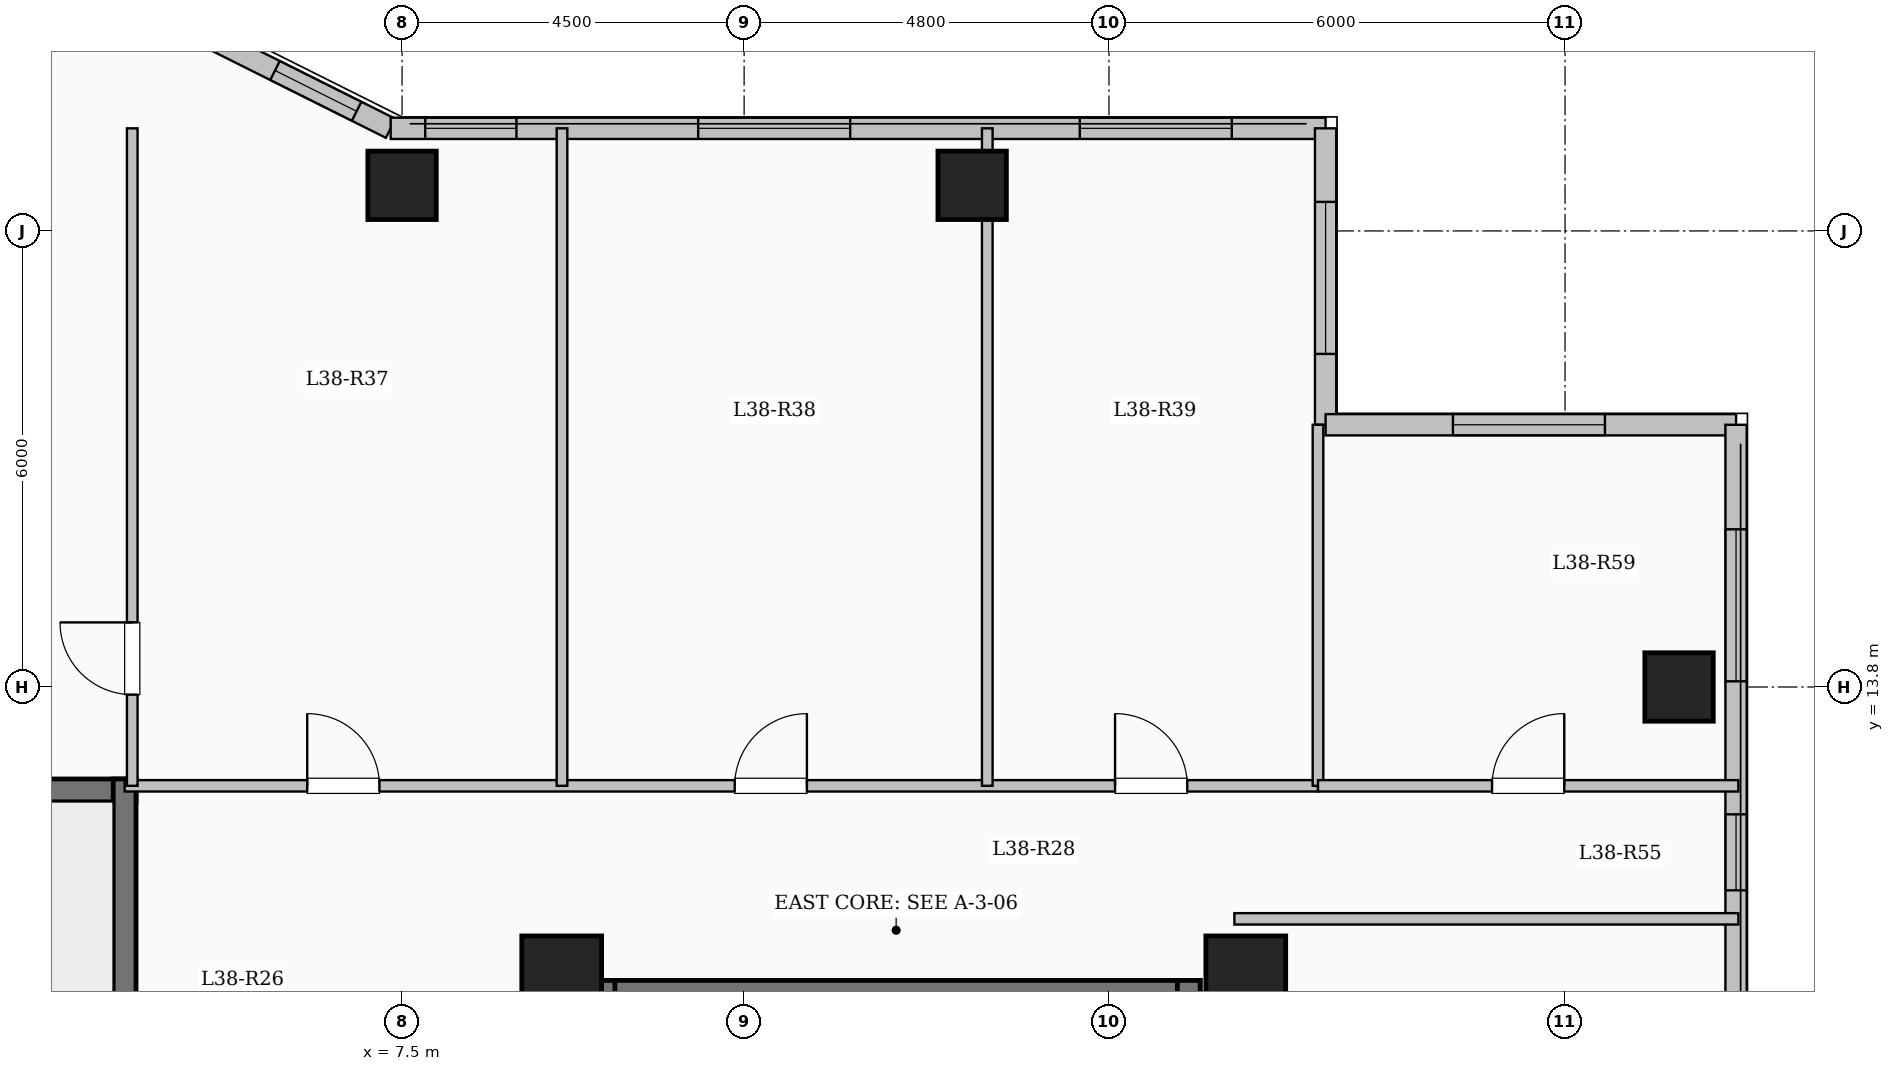
"""IFC4 building model, lengths in metres.
Left out: names, types, materials, properties, quantities, classifications, styles, units other than length and angle.
Written with IfcOpenShell. Run it as: python <this file> out.ifc"""

import sys

from ifc_helpers import new_model, si_unit, direction, frame, frame_2d, origin, origin_2d, place, context, subcontext, project, spatial, rectangle, extrude, element, fill, save


model = new_model("IFC4")
c1 = context("Model", 3, precision=1e-05, world=origin(), true_north=direction((0.0, 1.0)))
c2 = subcontext(c1, "Body", "Model", "MODEL_VIEW")
j1 = project(units=[si_unit("LENGTHUNIT", "METRE"), si_unit("PLANEANGLEUNIT", "RADIAN")], contexts=[c1])
p1 = place(None, origin())
s1 = spatial("IfcSite", under=j1, at=p1, CompositionType="ELEMENT")
p2 = place(p1, origin())
s2 = spatial("IfcBuilding", under=s1, at=p2, CompositionType="ELEMENT")
p3 = place(p2, frame((0.0, 0.0, 142.65)))
s3 = spatial("IfcBuildingStorey", under=s2, at=p3, CompositionType="ELEMENT", Elevation=142.65)
for number, where, z_axis, x_axis in (
    (1, (9.6, 10.0, 0.0), (0.0, 0.0, 1.0), (1.0, 0.0, 0.0)),
    (2, (18.6, 10.0, 0.0), (0.0, 0.0, 1.0), (1.0, 0.0, 0.0)),
):
    element("IfcColumn", number, at=place(p3, frame(where, z_axis=z_axis, x_axis=x_axis)), inside=s3, PredefinedType="COLUMN", context=c2, shape_type="SweptSolid", body=[
        extrude(rectangle(XDim=1.05, YDim=1.05, at=origin_2d()), origin(), (0.0, 0.0, 1.0), 3.35),
    ])
for number, where, z_axis, x_axis in (
    (3, (7.5, 20.4, 0.0), (0.0, 0.0, 1.0), (1.0, 0.0, 0.0)),
    (4, (15.0, 20.4, 0.0), (0.0, 0.0, 1.0), (1.0, 0.0, 0.0)),
    (5, (24.3, 13.8, 0.0), (0.0, 0.0, 1.0), (1.0, 0.0, 0.0)),
):
    element("IfcColumn", number, at=place(p3, frame(where, z_axis=z_axis, x_axis=x_axis)), inside=s3, PredefinedType="COLUMN", context=c2, shape_type="SweptSolid", body=[
        extrude(rectangle(XDim=0.9, YDim=0.9, at=origin_2d()), origin(), (0.0, 0.0, 1.0), 3.35),
    ])
p4 = place(p3, frame((4.35, 22.65, 0.0), z_axis=(0.0, 0.0, 1.0), x_axis=(0.894427191, -0.4472135955, 0.0)))
e6 = element("IfcWall", 6, at=p4, inside=s3, PredefinedType="SOLIDWALL", context=c2, shape_type="SweptSolid", body=[
    extrude(rectangle(XDim=3.354, YDim=0.28, at=frame_2d((1.677, 0.0))), origin(), (0.0, 0.0, 1.0), 3.1),
])
p5 = place(p4, frame((1.653, 0.0, 0.95)))
e7 = element("IfcOpeningElement", 7, at=p5, cuts=e6, PredefinedType="OPENING", context=c2, shape_type="SweptSolid", body=[
    extrude(rectangle(XDim=1.2, YDim=1.5, at=frame_2d((0.6, 0.75))), frame((0.0, 0.15, 0.0), z_axis=(0.0, -1.0, 0.0), x_axis=(1.0, 0.0, 0.0)), (0.0, 0.0, 1.0), 0.3),
])
p6 = place(p3, frame((7.35, 21.15, 0.0), z_axis=(0.0, 0.0, 1.0), x_axis=(1.0, 0.0, 0.0)))
e8 = element("IfcWall", 8, at=p6, inside=s3, PredefinedType="SOLIDWALL", context=c2, shape_type="SweptSolid", body=[
    extrude(rectangle(XDim=12.3, YDim=0.28, at=frame_2d((6.15, 0.0))), origin(), (0.0, 0.0, 1.0), 3.1),
])
p7 = place(p6, frame((0.454, 0.0, 0.95)))
e9 = element("IfcOpeningElement", 9, at=p7, cuts=e8, PredefinedType="OPENING", context=c2, shape_type="SweptSolid", body=[
    extrude(rectangle(XDim=1.2, YDim=1.5, at=frame_2d((0.6, 0.75))), frame((0.0, 0.15, 0.0), z_axis=(0.0, -1.0, 0.0), x_axis=(1.0, 0.0, 0.0)), (0.0, 0.0, 1.0), 0.3),
])
p8 = place(p6, frame((4.045, 0.0, 0.9)))
e10 = element("IfcOpeningElement", 10, at=p8, cuts=e8, PredefinedType="OPENING", context=c2, shape_type="SweptSolid", body=[
    extrude(rectangle(XDim=2.0, YDim=1.7, at=frame_2d((1.0, 0.85))), frame((0.0, 0.15, 0.0), z_axis=(0.0, -1.0, 0.0), x_axis=(1.0, 0.0, 0.0)), (0.0, 0.0, 1.0), 0.3),
])
p9 = place(p6, frame((9.066, 0.0, 0.9)))
e11 = element("IfcOpeningElement", 11, at=p9, cuts=e8, PredefinedType="OPENING", context=c2, shape_type="SweptSolid", body=[
    extrude(rectangle(XDim=2.0, YDim=1.7, at=frame_2d((1.0, 0.85))), frame((0.0, 0.15, 0.0), z_axis=(0.0, -1.0, 0.0), x_axis=(1.0, 0.0, 0.0)), (0.0, 0.0, 1.0), 0.3),
])
p10 = place(p3, frame((19.65, 21.15, 0.0), z_axis=(0.0, 0.0, 1.0), x_axis=(0.0, -1.0, 0.0)))
e12 = element("IfcWall", 12, at=p10, inside=s3, PredefinedType="SOLIDWALL", context=c2, shape_type="SweptSolid", body=[
    extrude(rectangle(XDim=3.9, YDim=0.28, at=frame_2d((1.95, 0.0))), origin(), (0.0, 0.0, 1.0), 3.1),
])
p11 = place(p10, frame((0.968, 0.0, 0.9)))
e13 = element("IfcOpeningElement", 13, at=p11, cuts=e12, PredefinedType="OPENING", context=c2, shape_type="SweptSolid", body=[
    extrude(rectangle(XDim=2.0, YDim=1.7, at=frame_2d((1.0, 0.85))), frame((0.0, 0.15, 0.0), z_axis=(0.0, -1.0, 0.0), x_axis=(1.0, 0.0, 0.0)), (0.0, 0.0, 1.0), 0.3),
])
p12 = place(p3, frame((19.65, 17.25, 0.0), z_axis=(0.0, 0.0, 1.0), x_axis=(1.0, 0.0, 0.0)))
e14 = element("IfcWall", 14, at=p12, inside=s3, PredefinedType="SOLIDWALL", context=c2, shape_type="SweptSolid", body=[
    extrude(rectangle(XDim=5.4, YDim=0.28, at=frame_2d((2.7, 0.0))), origin(), (0.0, 0.0, 1.0), 3.1),
])
p13 = place(p12, frame((1.675, 0.0, 0.9)))
e15 = element("IfcOpeningElement", 15, at=p13, cuts=e14, PredefinedType="OPENING", context=c2, shape_type="SweptSolid", body=[
    extrude(rectangle(XDim=2.0, YDim=1.7, at=frame_2d((1.0, 0.85))), frame((0.0, 0.15, 0.0), z_axis=(0.0, -1.0, 0.0), x_axis=(1.0, 0.0, 0.0)), (0.0, 0.0, 1.0), 0.3),
])
p14 = place(p3, frame((25.05, 17.25, 0.0), z_axis=(0.0, 0.0, 1.0), x_axis=(0.0, -1.0, 0.0)))
e16 = element("IfcWall", 16, at=p14, inside=s3, PredefinedType="SOLIDWALL", context=c2, shape_type="SweptSolid", body=[
    extrude(rectangle(XDim=34.5, YDim=0.28, at=frame_2d((17.25, 0.0))), origin(), (0.0, 0.0, 1.0), 3.1),
])
p15 = place(p14, frame((1.375, 0.0, 0.9)))
e17 = element("IfcOpeningElement", 17, at=p15, cuts=e16, PredefinedType="OPENING", context=c2, shape_type="SweptSolid", body=[
    extrude(rectangle(XDim=2.0, YDim=1.7, at=frame_2d((1.0, 0.85))), frame((0.0, 0.15, 0.0), z_axis=(0.0, -1.0, 0.0), x_axis=(1.0, 0.0, 0.0)), (0.0, 0.0, 1.0), 0.3),
])
p16 = place(p14, frame((5.125, 0.0, 0.95)))
e18 = element("IfcOpeningElement", 18, at=p16, cuts=e16, PredefinedType="OPENING", context=c2, shape_type="SweptSolid", body=[
    extrude(rectangle(XDim=1.0, YDim=1.5, at=frame_2d((0.5, 0.75))), frame((0.0, 0.15, 0.0), z_axis=(0.0, -1.0, 0.0), x_axis=(1.0, 0.0, 0.0)), (0.0, 0.0, 1.0), 0.3),
])
p17 = place(p14, frame((14.5, 0.0, 0.9)))
e19 = element("IfcOpeningElement", 19, at=p17, cuts=e16, PredefinedType="OPENING", context=c2, shape_type="SweptSolid", body=[
    extrude(rectangle(XDim=2.0, YDim=1.7, at=frame_2d((1.0, 0.85))), frame((0.0, 0.15, 0.0), z_axis=(0.0, -1.0, 0.0), x_axis=(1.0, 0.0, 0.0)), (0.0, 0.0, 1.0), 0.3),
])
p18 = place(p14, frame((25.258, 0.0, 0.9)))
e20 = element("IfcOpeningElement", 20, at=p18, cuts=e16, PredefinedType="OPENING", context=c2, shape_type="SweptSolid", body=[
    extrude(rectangle(XDim=1.5, YDim=1.65, at=frame_2d((0.75, 0.825))), frame((0.0, 0.15, 0.0), z_axis=(0.0, -1.0, 0.0), x_axis=(1.0, 0.0, 0.0)), (0.0, 0.0, 1.0), 0.3),
])
p19 = place(p14, frame((29.95, 0.0, 0.9)))
e21 = element("IfcOpeningElement", 21, at=p19, cuts=e16, PredefinedType="OPENING", context=c2, shape_type="SweptSolid", body=[
    extrude(rectangle(XDim=2.2, YDim=1.75, at=frame_2d((1.1, 0.875))), frame((0.0, 0.15, 0.0), z_axis=(0.0, -1.0, 0.0), x_axis=(1.0, 0.0, 0.0)), (0.0, 0.0, 1.0), 0.3),
])
p20 = place(p3, frame((10.0, 9.79, 0.0), z_axis=(0.0, 0.0, 1.0), x_axis=(1.0, 0.0, 0.0)))
e22 = element("IfcWall", 22, at=p20, inside=s3, PredefinedType="SHEAR", context=c2, shape_type="SweptSolid", body=[
    extrude(rectangle(XDim=8.0, YDim=0.3, at=frame_2d((4.0, 0.0))), origin(), (0.0, 0.0, 1.0), 3.35),
])
for number, where, z_axis, x_axis in (
    (23, (10.15, 6.35, 0.0), (0.0, 0.0, 1.0), (0.0, 1.0, 0.0)),
    (24, (17.85, 6.35, 0.0), (0.0, 0.0, 1.0), (0.0, 1.0, 0.0)),
):
    element("IfcWall", number, at=place(p3, frame(where, z_axis=z_axis, x_axis=x_axis)), inside=s3, PredefinedType="SHEAR", context=c2, shape_type="SweptSolid", body=[
        extrude(rectangle(XDim=3.59, YDim=0.3, at=frame_2d((1.795, 0.0))), origin(), (0.0, 0.0, 1.0), 3.35),
    ])
p21 = place(p3, frame((-4.0, 12.44, 0.0), z_axis=(0.0, 0.0, 1.0), x_axis=(1.0, 0.0, 0.0)))
e25 = element("IfcWall", 25, at=p21, inside=s3, PredefinedType="SHEAR", context=c2, shape_type="SweptSolid", body=[
    extrude(rectangle(XDim=8.0, YDim=0.3, at=frame_2d((4.0, 0.0))), origin(), (0.0, 0.0, 1.0), 3.35),
])
p22 = place(p3, frame((3.85, 9.0, 0.0), z_axis=(0.0, 0.0, 1.0), x_axis=(0.0, 1.0, 0.0)))
e26 = element("IfcWall", 26, at=p22, inside=s3, PredefinedType="SHEAR", context=c2, shape_type="SweptSolid", body=[
    extrude(rectangle(XDim=3.59, YDim=0.3, at=frame_2d((1.795, 0.0))), origin(), (0.0, 0.0, 1.0), 3.35),
])
p23 = place(p3, frame((3.85, 12.5, 0.0), z_axis=(0.0, 0.0, 1.0), x_axis=(1.0, 0.0, 0.0)))
e27 = element("IfcWall", 27, at=p23, inside=s3, PredefinedType="PARTITIONING", context=c2, shape_type="SweptSolid", body=[
    extrude(rectangle(XDim=15.7, YDim=0.15, at=frame_2d((7.85, 0.0))), origin(), (0.0, 0.0, 1.0), 3.1),
])
p24 = place(p23, frame((2.402, 0.0, 0.0)))
e28 = element("IfcOpeningElement", 28, at=p24, cuts=e27, PredefinedType="OPENING", context=c2, shape_type="SweptSolid", body=[
    extrude(rectangle(XDim=0.95, YDim=2.15, at=frame_2d((0.475, 1.075))), frame((0.0, 0.085, 0.0), z_axis=(0.0, -1.0, 0.0), x_axis=(1.0, 0.0, 0.0)), (0.0, 0.0, 1.0), 0.17),
])
p25 = place(p23, frame((8.026, 0.0, 0.0)))
e29 = element("IfcOpeningElement", 29, at=p25, cuts=e27, PredefinedType="OPENING", context=c2, shape_type="SweptSolid", body=[
    extrude(rectangle(XDim=0.95, YDim=2.15, at=frame_2d((0.475, 1.075))), frame((0.0, 0.085, 0.0), z_axis=(0.0, -1.0, 0.0), x_axis=(1.0, 0.0, 0.0)), (0.0, 0.0, 1.0), 0.17),
])
p26 = place(p23, frame((13.03, 0.0, 0.0)))
e30 = element("IfcOpeningElement", 30, at=p26, cuts=e27, PredefinedType="OPENING", context=c2, shape_type="SweptSolid", body=[
    extrude(rectangle(XDim=0.95, YDim=2.15, at=frame_2d((0.475, 1.075))), frame((0.0, 0.085, 0.0), z_axis=(0.0, -1.0, 0.0), x_axis=(1.0, 0.0, 0.0)), (0.0, 0.0, 1.0), 0.17),
])
p27 = place(p3, frame((3.95, 12.5, 0.0), z_axis=(0.0, 0.0, 1.0), x_axis=(0.0, 1.0, 0.0)))
e31 = element("IfcWall", 31, at=p27, inside=s3, PredefinedType="PARTITIONING", context=c2, shape_type="SweptSolid", body=[
    extrude(rectangle(XDim=8.65, YDim=0.14, at=frame_2d((4.325, 0.0))), origin(), (0.0, 0.0, 1.0), 3.1),
])
p28 = place(p27, frame((1.2, 0.0, 0.0)))
e32 = element("IfcOpeningElement", 32, at=p28, cuts=e31, PredefinedType="OPENING", context=c2, shape_type="SweptSolid", body=[
    extrude(rectangle(XDim=0.95, YDim=2.15, at=frame_2d((0.475, 1.075))), frame((0.0, 0.08, 0.0), z_axis=(0.0, -1.0, 0.0), x_axis=(1.0, 0.0, 0.0)), (0.0, 0.0, 1.0), 0.16),
])
p29 = place(p3, frame((9.604, 12.5, 0.0), z_axis=(0.0, 0.0, 1.0), x_axis=(0.0, 1.0, 0.0)))
e33 = element("IfcWall", 33, at=p29, inside=s3, PredefinedType="PARTITIONING", context=c2, shape_type="SweptSolid", body=[
    extrude(rectangle(XDim=8.65, YDim=0.14, at=frame_2d((4.325, 0.0))), origin(), (0.0, 0.0, 1.0), 3.1),
])
p30 = place(p3, frame((15.199, 12.5, 0.0), z_axis=(0.0, 0.0, 1.0), x_axis=(0.0, 1.0, 0.0)))
e34 = element("IfcWall", 34, at=p30, inside=s3, PredefinedType="PARTITIONING", context=c2, shape_type="SweptSolid", body=[
    extrude(rectangle(XDim=8.65, YDim=0.14, at=frame_2d((4.325, 0.0))), origin(), (0.0, 0.0, 1.0), 2.585),
])
p31 = place(p3, frame((18.45, 10.75, 0.0), z_axis=(0.0, 0.0, 1.0), x_axis=(1.0, 0.0, 0.0)))
e35 = element("IfcWall", 35, at=p31, inside=s3, PredefinedType="PARTITIONING", context=c2, shape_type="SweptSolid", body=[
    extrude(rectangle(XDim=6.63, YDim=0.15, at=frame_2d((3.315, 0.0))), origin(), (0.0, 0.0, 1.0), 3.1),
])
p32 = place(p3, frame((19.55, 12.5, 0.0), z_axis=(0.0, 0.0, 1.0), x_axis=(0.0, 1.0, 0.0)))
e36 = element("IfcWall", 36, at=p32, inside=s3, PredefinedType="PARTITIONING", context=c2, shape_type="SweptSolid", body=[
    extrude(rectangle(XDim=4.75, YDim=0.14, at=frame_2d((2.375, 0.0))), origin(), (0.0, 0.0, 1.0), 3.1),
])
p33 = place(p3, frame((19.55, 12.5, 0.0), z_axis=(0.0, 0.0, 1.0), x_axis=(1.0, 0.0, 0.0)))
e37 = element("IfcWall", 37, at=p33, inside=s3, PredefinedType="PARTITIONING", context=c2, shape_type="SweptSolid", body=[
    extrude(rectangle(XDim=5.53, YDim=0.15, at=frame_2d((2.765, 0.0))), origin(), (0.0, 0.0, 1.0), 3.1),
])
p34 = place(p33, frame((2.29, 0.0, 0.0)))
e38 = element("IfcOpeningElement", 38, at=p34, cuts=e37, PredefinedType="OPENING", context=c2, shape_type="SweptSolid", body=[
    extrude(rectangle(XDim=0.95, YDim=2.15, at=frame_2d((0.475, 1.075))), frame((0.0, 0.085, 0.0), z_axis=(0.0, -1.0, 0.0), x_axis=(1.0, 0.0, 0.0)), (0.0, 0.0, 1.0), 0.17),
])
p35 = place(p5, origin())
e39 = element("IfcWindow", 39, at=p35, inside=s3, PartitioningType="SINGLE_PANEL", PredefinedType="WINDOW", context=c2, shape_type="SweptSolid", body=[
    extrude(rectangle(XDim=1.2, YDim=1.5, at=frame_2d((0.6, 0.75))), frame((0.0, 0.03, 0.0), z_axis=(0.0, -1.0, 0.0), x_axis=(1.0, 0.0, 0.0)), (0.0, 0.0, 1.0), 0.06),
])
fill(e7, e39)
p36 = place(p7, origin())
e40 = element("IfcWindow", 40, at=p36, inside=s3, PartitioningType="SINGLE_PANEL", PredefinedType="WINDOW", context=c2, shape_type="SweptSolid", body=[
    extrude(rectangle(XDim=1.2, YDim=1.5, at=frame_2d((0.6, 0.75))), frame((0.0, 0.03, 0.0), z_axis=(0.0, -1.0, 0.0), x_axis=(1.0, 0.0, 0.0)), (0.0, 0.0, 1.0), 0.06),
])
fill(e9, e40)
p37 = place(p8, origin())
e41 = element("IfcWindow", 41, at=p37, inside=s3, PartitioningType="SINGLE_PANEL", PredefinedType="WINDOW", context=c2, shape_type="SweptSolid", body=[
    extrude(rectangle(XDim=2.0, YDim=1.7, at=frame_2d((1.0, 0.85))), frame((0.0, 0.03, 0.0), z_axis=(0.0, -1.0, 0.0), x_axis=(1.0, 0.0, 0.0)), (0.0, 0.0, 1.0), 0.06),
])
fill(e10, e41)
p38 = place(p9, origin())
e42 = element("IfcWindow", 42, at=p38, inside=s3, PartitioningType="SINGLE_PANEL", PredefinedType="WINDOW", context=c2, shape_type="SweptSolid", body=[
    extrude(rectangle(XDim=2.0, YDim=1.7, at=frame_2d((1.0, 0.85))), frame((0.0, 0.03, 0.0), z_axis=(0.0, -1.0, 0.0), x_axis=(1.0, 0.0, 0.0)), (0.0, 0.0, 1.0), 0.06),
])
fill(e11, e42)
p39 = place(p11, origin())
e43 = element("IfcWindow", 43, at=p39, inside=s3, PartitioningType="SINGLE_PANEL", PredefinedType="WINDOW", context=c2, shape_type="SweptSolid", body=[
    extrude(rectangle(XDim=2.0, YDim=1.7, at=frame_2d((1.0, 0.85))), frame((0.0, 0.03, 0.0), z_axis=(0.0, -1.0, 0.0), x_axis=(1.0, 0.0, 0.0)), (0.0, 0.0, 1.0), 0.06),
])
fill(e13, e43)
p40 = place(p13, origin())
e44 = element("IfcWindow", 44, at=p40, inside=s3, PartitioningType="SINGLE_PANEL", PredefinedType="WINDOW", context=c2, shape_type="SweptSolid", body=[
    extrude(rectangle(XDim=2.0, YDim=1.7, at=frame_2d((1.0, 0.85))), frame((0.0, 0.03, 0.0), z_axis=(0.0, -1.0, 0.0), x_axis=(1.0, 0.0, 0.0)), (0.0, 0.0, 1.0), 0.06),
])
fill(e15, e44)
p41 = place(p15, origin())
e45 = element("IfcWindow", 45, at=p41, inside=s3, PartitioningType="SINGLE_PANEL", PredefinedType="WINDOW", context=c2, shape_type="SweptSolid", body=[
    extrude(rectangle(XDim=2.0, YDim=1.7, at=frame_2d((1.0, 0.85))), frame((0.0, 0.03, 0.0), z_axis=(0.0, -1.0, 0.0), x_axis=(1.0, 0.0, 0.0)), (0.0, 0.0, 1.0), 0.06),
])
fill(e17, e45)
p42 = place(p16, origin())
e46 = element("IfcWindow", 46, at=p42, inside=s3, PartitioningType="SINGLE_PANEL", PredefinedType="WINDOW", context=c2, shape_type="SweptSolid", body=[
    extrude(rectangle(XDim=1.0, YDim=1.5, at=frame_2d((0.5, 0.75))), frame((0.0, 0.03, 0.0), z_axis=(0.0, -1.0, 0.0), x_axis=(1.0, 0.0, 0.0)), (0.0, 0.0, 1.0), 0.06),
])
fill(e18, e46)
p43 = place(p24, origin())
e47 = element("IfcDoor", 47, at=p43, inside=s3, OperationType="SINGLE_SWING_LEFT", PredefinedType="DOOR", context=c2, shape_type="SweptSolid", body=[
    extrude(rectangle(XDim=0.95, YDim=2.15, at=frame_2d((0.475, 1.075))), frame((0.0, 0.025, 0.0), z_axis=(0.0, -1.0, 0.0), x_axis=(1.0, 0.0, 0.0)), (0.0, 0.0, 1.0), 0.05),
])
fill(e28, e47)
p44 = place(p25, origin())
e48 = element("IfcDoor", 48, at=p44, inside=s3, OperationType="SINGLE_SWING_RIGHT", PredefinedType="DOOR", context=c2, shape_type="SweptSolid", body=[
    extrude(rectangle(XDim=0.95, YDim=2.15, at=frame_2d((0.475, 1.075))), frame((0.0, 0.025, 0.0), z_axis=(0.0, -1.0, 0.0), x_axis=(1.0, 0.0, 0.0)), (0.0, 0.0, 1.0), 0.05),
])
fill(e29, e48)
p45 = place(p26, origin())
e49 = element("IfcDoor", 49, at=p45, inside=s3, OperationType="SINGLE_SWING_LEFT", PredefinedType="DOOR", context=c2, shape_type="SweptSolid", body=[
    extrude(rectangle(XDim=0.95, YDim=2.15, at=frame_2d((0.475, 1.075))), frame((0.0, 0.025, 0.0), z_axis=(0.0, -1.0, 0.0), x_axis=(1.0, 0.0, 0.0)), (0.0, 0.0, 1.0), 0.05),
])
fill(e30, e49)
p46 = place(p28, origin())
e50 = element("IfcDoor", 50, at=p46, inside=s3, OperationType="SINGLE_SWING_RIGHT", PredefinedType="DOOR", context=c2, shape_type="SweptSolid", body=[
    extrude(rectangle(XDim=0.95, YDim=2.15, at=frame_2d((0.475, 1.075))), frame((0.0, 0.025, 0.0), z_axis=(0.0, -1.0, 0.0), x_axis=(1.0, 0.0, 0.0)), (0.0, 0.0, 1.0), 0.05),
])
fill(e32, e50)
p47 = place(p34, origin())
e51 = element("IfcDoor", 51, at=p47, inside=s3, OperationType="SINGLE_SWING_RIGHT", PredefinedType="DOOR", context=c2, shape_type="SweptSolid", body=[
    extrude(rectangle(XDim=0.95, YDim=2.15, at=frame_2d((0.475, 1.075))), frame((0.0, 0.025, 0.0), z_axis=(0.0, -1.0, 0.0), x_axis=(1.0, 0.0, 0.0)), (0.0, 0.0, 1.0), 0.05),
])
fill(e38, e51)
save(model, sys.argv[1])
